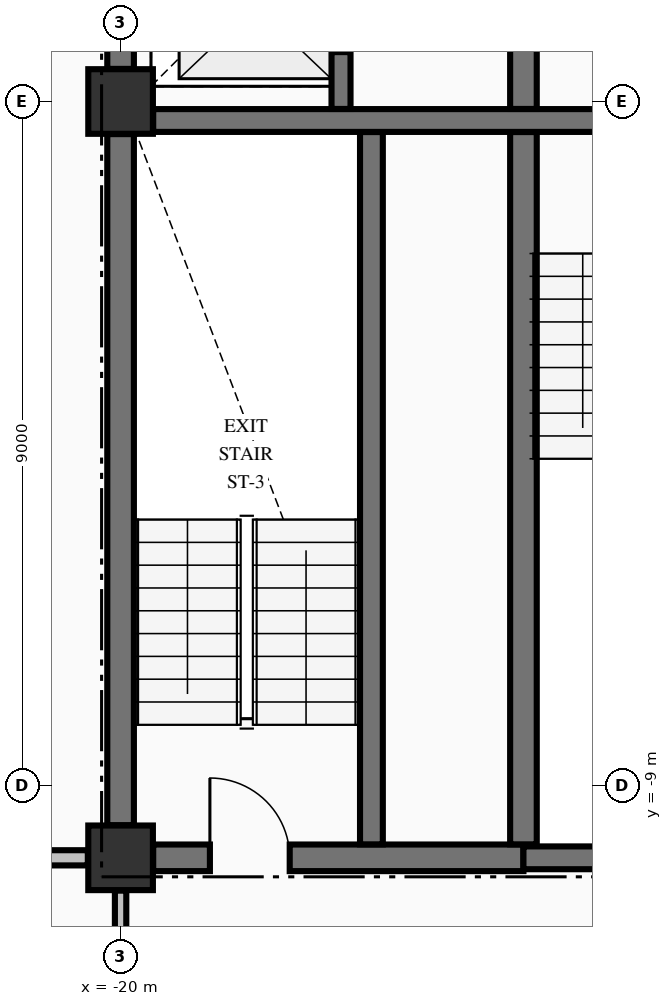
"""IFC4 building model, lengths in metres.
Left out: names, types, materials, properties, quantities, classifications, styles, units other than length and angle.
Written with IfcOpenShell. Run it as: python <this file> out.ifc"""

import sys

from ifc_helpers import new_model, si_unit, direction, frame, frame_2d, origin, origin_2d, place, context, subcontext, project, spatial, rectangle, extrude, element, fill, save


model = new_model("IFC4")
c1 = context("Model", 3, precision=1e-05, world=origin(), true_north=direction((0.0, 1.0)))
c2 = subcontext(c1, "Body", "Model", "MODEL_VIEW")
j1 = project(units=[si_unit("LENGTHUNIT", "METRE"), si_unit("PLANEANGLEUNIT", "RADIAN")], contexts=[c1])
p1 = place(None, origin())
s1 = spatial("IfcSite", under=j1, at=p1, CompositionType="ELEMENT")
p2 = place(p1, origin())
s2 = spatial("IfcBuilding", under=s1, at=p2, CompositionType="ELEMENT")
p3 = place(p2, frame((0.0, 0.0, 215.26)))
s3 = spatial("IfcBuildingStorey", under=s2, at=p3, CompositionType="ELEMENT", Elevation=215.26)
for number, where, z_axis, x_axis in (
    (1, (-20.0, -9.95, -0.25), (0.0, 0.0, 1.0), (1.0, 0.0, 0.0)),
    (2, (-20.0, 0.0, -0.25), (0.0, 0.0, 1.0), (1.0, 0.0, 0.0)),
):
    element("IfcColumn", number, at=place(p3, frame(where, z_axis=z_axis, x_axis=x_axis)), inside=s3, PredefinedType="COLUMN", context=c2, shape_type="SweptSolid", body=[
        extrude(rectangle(XDim=0.85, YDim=0.85, at=origin_2d()), origin(), (0.0, 0.0, 1.0), 3.4),
    ])
p4 = place(p3, frame((-19.571, -9.95, 0.0), z_axis=(0.0, 0.0, 1.0), x_axis=(1.0, 0.0, 0.0)))
e3 = element("IfcWall", 3, at=p4, inside=s3, PredefinedType="SHEAR", context=c2, shape_type="SweptSolid", body=[
    extrude(rectangle(XDim=4.871, YDim=0.35, at=frame_2d((2.436, 0.0))), origin(), (0.0, 0.0, 1.0), 3.15),
])
p5 = place(p4, frame((0.746, 0.0, 0.0)))
e4 = element("IfcOpeningElement", 4, at=p5, cuts=e3, PredefinedType="OPENING", context=c2, shape_type="SweptSolid", body=[
    extrude(rectangle(XDim=1.05, YDim=2.15, at=frame_2d((0.525, 1.075))), frame((0.0, 0.185, 0.0), z_axis=(0.0, -1.0, 0.0), x_axis=(1.0, 0.0, 0.0)), (0.0, 0.0, 1.0), 0.37),
])
p6 = place(p3, frame((-14.7, -9.95, 0.0), z_axis=(0.0, 0.0, 1.0), x_axis=(1.0, 0.0, 0.0)))
e5 = element("IfcWall", 5, at=p6, inside=s3, PredefinedType="SHEAR", context=c2, shape_type="SweptSolid", body=[
    extrude(rectangle(XDim=3.271, YDim=0.3, at=frame_2d((1.635, 0.0))), origin(), (0.0, 0.0, 1.0), 3.15),
])
p7 = place(p3, frame((-19.571, -0.25, 0.0), z_axis=(0.0, 0.0, 1.0), x_axis=(1.0, 0.0, 0.0)))
e6 = element("IfcWall", 6, at=p7, inside=s3, PredefinedType="SHEAR", context=c2, shape_type="SweptSolid", body=[
    extrude(rectangle(XDim=8.142, YDim=0.3, at=frame_2d((4.071, 0.0))), origin(), (0.0, 0.0, 1.0), 3.15),
])
p8 = place(p7, frame((5.871, 0.0, 0.0)))
e7 = element("IfcOpeningElement", 7, at=p8, cuts=e6, PredefinedType="OPENING", context=c2, shape_type="SweptSolid", body=[
    extrude(rectangle(XDim=1.1, YDim=2.15, at=frame_2d((0.55, 1.075))), frame((0.0, 0.16, 0.0), z_axis=(0.0, -1.0, 0.0), x_axis=(1.0, 0.0, 0.0)), (0.0, 0.0, 1.0), 0.32),
])
p9 = place(p3, frame((-26.835, -9.95, 0.0), z_axis=(0.0, 0.0, 1.0), x_axis=(1.0, 0.0, 0.0)))
e8 = element("IfcWall", 8, at=p9, inside=s3, PredefinedType="PARTITIONING", context=c2, shape_type="SweptSolid", body=[
    extrude(rectangle(XDim=6.404, YDim=0.2, at=frame_2d((3.202, 0.0))), origin(), (0.0, 0.0, 1.0), 3.15),
])
p10 = place(p3, frame((-20.0, -9.521, 0.0), z_axis=(0.0, 0.0, 1.0), x_axis=(0.0, 1.0, 0.0)))
e9 = element("IfcWall", 9, at=p10, inside=s3, PredefinedType="SHEAR", context=c2, shape_type="SweptSolid", body=[
    extrude(rectangle(XDim=9.092, YDim=0.35, at=frame_2d((4.546, 0.0))), origin(), (0.0, 0.0, 1.0), 3.15),
])
p11 = place(p3, frame((-20.0, 0.429, 0.0), z_axis=(0.0, 0.0, 1.0), x_axis=(0.0, 1.0, 0.0)))
e10 = element("IfcWall", 10, at=p11, inside=s3, PredefinedType="SHEAR", context=c2, shape_type="SweptSolid", body=[
    extrude(rectangle(XDim=2.094, YDim=0.35, at=frame_2d((1.047, 0.0))), origin(), (0.0, 0.0, 1.0), 3.15),
])
p12 = place(p3, frame((-17.1, -0.098, 0.0), z_axis=(0.0, 0.0, 1.0), x_axis=(0.0, 1.0, 0.0)))
e11 = element("IfcWall", 11, at=p12, inside=s3, PredefinedType="SOLIDWALL", context=c2, shape_type="SweptSolid", body=[
    extrude(rectangle(XDim=2.621, YDim=0.25, at=frame_2d((1.311, 0.0))), origin(), (0.0, 0.0, 1.0), 3.15),
])
p13 = place(p12, frame((0.748, 0.0, 0.0)))
e12 = element("IfcOpeningElement", 12, at=p13, cuts=e11, PredefinedType="OPENING", context=c2, shape_type="SweptSolid", body=[
    extrude(rectangle(XDim=1.1, YDim=2.2, at=frame_2d((0.55, 1.1))), frame((0.0, 0.135, 0.0), z_axis=(0.0, -1.0, 0.0), x_axis=(1.0, 0.0, 0.0)), (0.0, 0.0, 1.0), 0.27),
])
p14 = place(p3, frame((-16.7, -9.773, 0.0), z_axis=(0.0, 0.0, 1.0), x_axis=(0.0, 1.0, 0.0)))
e13 = element("IfcWall", 13, at=p14, inside=s3, PredefinedType="SHEAR", context=c2, shape_type="SweptSolid", body=[
    extrude(rectangle(XDim=9.371, YDim=0.3, at=frame_2d((4.686, 0.0))), origin(), (0.0, 0.0, 1.0), 3.15),
])
p15 = place(p3, frame((-14.7, -9.773, 0.0), z_axis=(0.0, 0.0, 1.0), x_axis=(0.0, 1.0, 0.0)))
e14 = element("IfcWall", 14, at=p15, inside=s3, PredefinedType="SHEAR", context=c2, shape_type="SweptSolid", body=[
    extrude(rectangle(XDim=9.371, YDim=0.35, at=frame_2d((4.686, 0.0))), origin(), (0.0, 0.0, 1.0), 3.15),
])
p16 = place(p3, frame((-14.7, -0.098, 0.0), z_axis=(0.0, 0.0, 1.0), x_axis=(0.0, 1.0, 0.0)))
e15 = element("IfcWall", 15, at=p16, inside=s3, PredefinedType="SHEAR", context=c2, shape_type="SweptSolid", body=[
    extrude(rectangle(XDim=2.846, YDim=0.35, at=frame_2d((1.423, 0.0))), origin(), (0.0, 0.0, 1.0), 3.15),
])
p17 = place(p3, frame((-20.0, -12.697, 0.0), z_axis=(0.0, 0.0, 1.0), x_axis=(0.0, 1.0, 0.0)))
e16 = element("IfcWall", 16, at=p17, inside=s3, PredefinedType="PARTITIONING", context=c2, shape_type="SweptSolid", body=[
    extrude(rectangle(XDim=2.316, YDim=0.15, at=frame_2d((1.158, 0.0))), origin(), (0.0, 0.0, 1.0), 2.342),
])
p18 = place(p5, origin())
e17 = element("IfcDoor", 17, at=p18, inside=s3, OperationType="SINGLE_SWING_LEFT", PredefinedType="DOOR", context=c2, shape_type="SweptSolid", body=[
    extrude(rectangle(XDim=1.05, YDim=2.15, at=frame_2d((0.525, 1.075))), frame((0.0, 0.025, 0.0), z_axis=(0.0, -1.0, 0.0), x_axis=(1.0, 0.0, 0.0)), (0.0, 0.0, 1.0), 0.05),
])
fill(e4, e17)
save(model, sys.argv[1])
